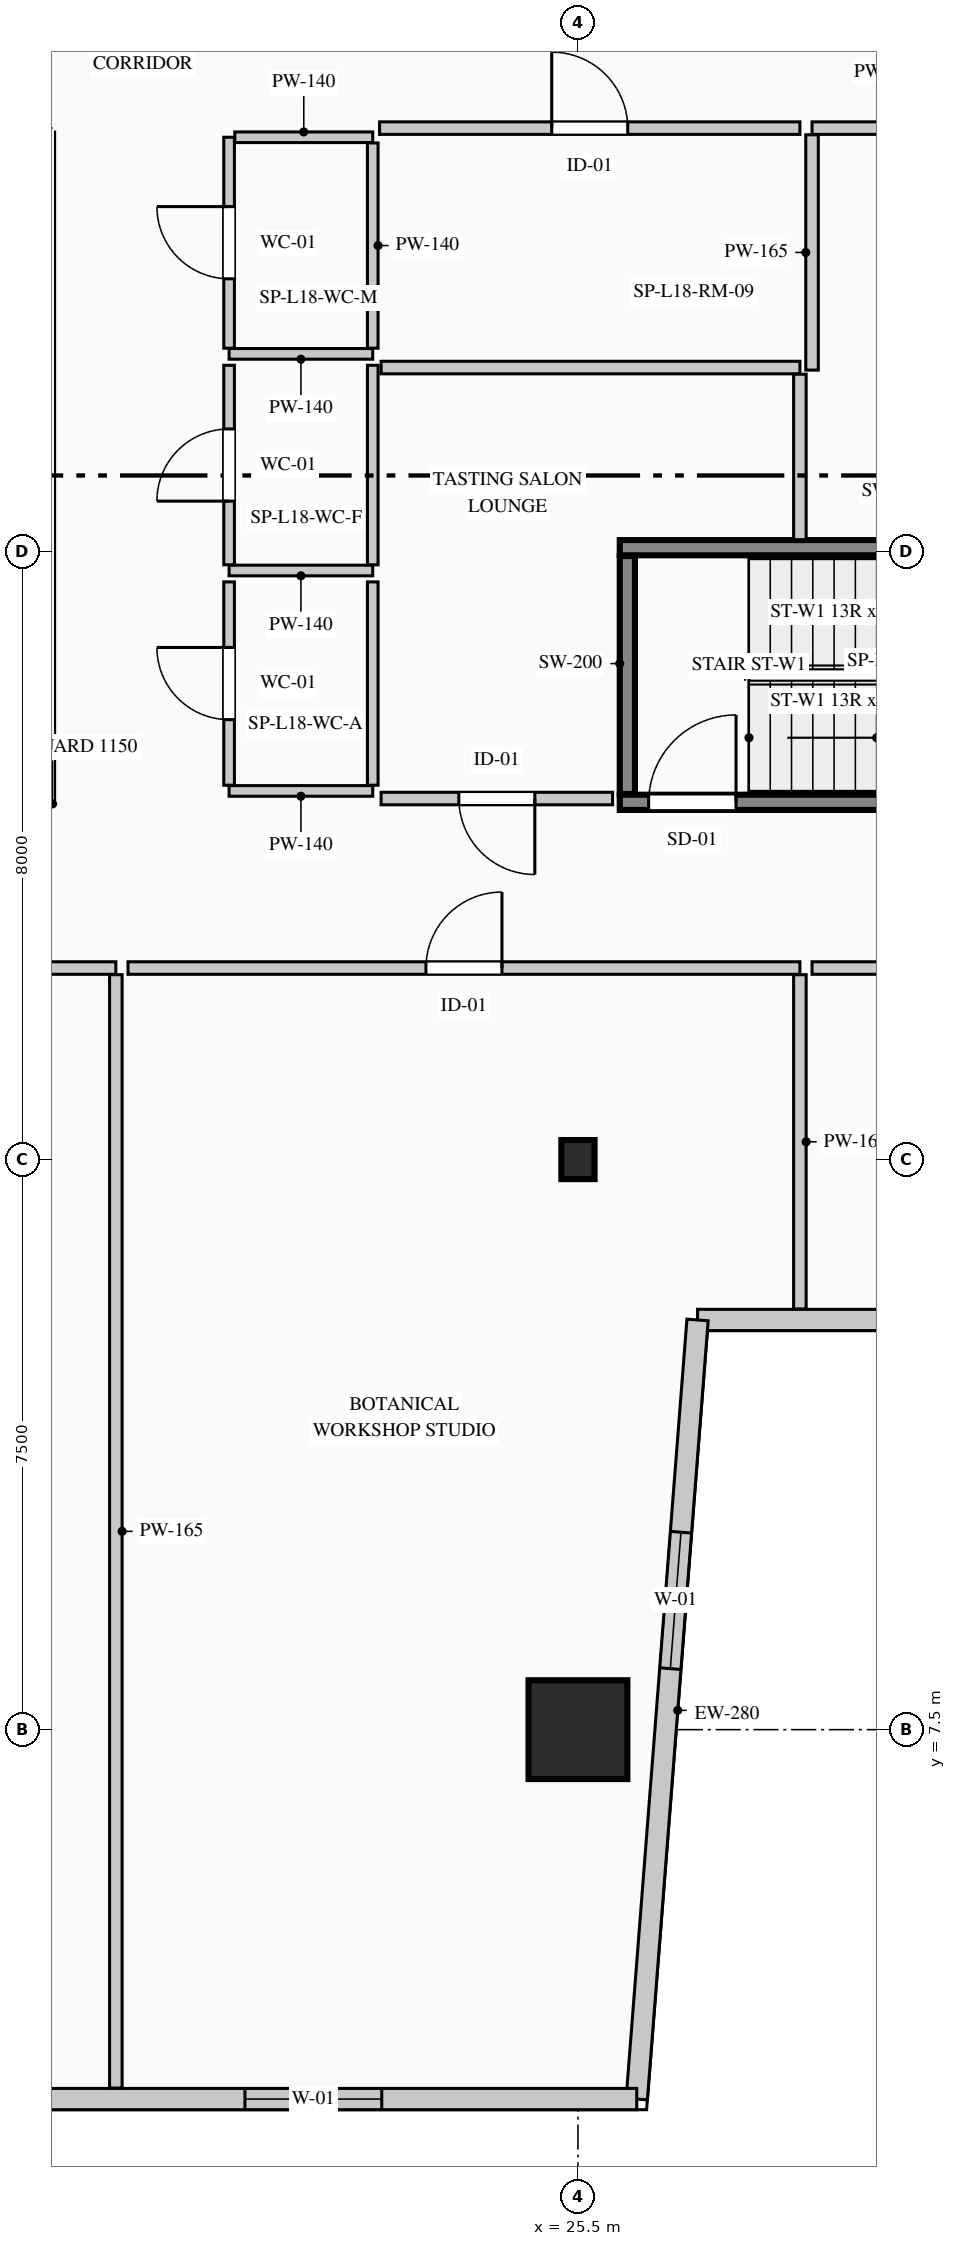
"""IFC4 building model, lengths in metres.
Left out: names, types, materials, properties, quantities, classifications, styles, units other than length and angle.
Written with IfcOpenShell. Run it as: python <this file> out.ifc"""

import sys

from ifc_helpers import new_model, si_unit, direction, frame, frame_2d, origin, origin_2d, place, context, subcontext, project, spatial, rectangle, i_section, extrude, element, fill, save


model = new_model("IFC4")
c1 = context("Model", 3, precision=1e-05, world=origin(), true_north=direction((0.0, 1.0)))
c2 = subcontext(c1, "Body", "Model", "MODEL_VIEW")
j1 = project(units=[si_unit("LENGTHUNIT", "METRE"), si_unit("PLANEANGLEUNIT", "RADIAN")], contexts=[c1])
p1 = place(None, origin())
s1 = spatial("IfcSite", under=j1, at=p1, CompositionType="ELEMENT")
p2 = place(p1, origin())
s2 = spatial("IfcBuilding", under=s1, at=p2, CompositionType="ELEMENT")
p3 = place(p2, frame((0.0, 0.0, 79.8)))
s3 = spatial("IfcBuildingStorey", under=s2, at=p3, CompositionType="ELEMENT", Elevation=79.8)
p4 = place(p3, frame((26.05, 19.7, 0.0), z_axis=(0.0, 0.0, 1.0), x_axis=(1.0, 0.0, 0.0)))
e1 = element("IfcWall", 1, at=p4, inside=s3, PredefinedType="SHEAR", context=c2, shape_type="SweptSolid", body=[
    extrude(rectangle(XDim=7.2, YDim=0.2, at=frame_2d((3.6, 0.0))), origin(), (0.0, 0.0, 1.0), 4.4),
])
p5 = place(p4, frame((0.38, 0.0, 0.0)))
e2 = element("IfcOpeningElement", 2, at=p5, cuts=e1, PredefinedType="OPENING", context=c2, shape_type="SweptSolid", body=[
    extrude(rectangle(XDim=1.15, YDim=2.2, at=frame_2d((0.575, 1.1))), frame((0.0, 0.11, 0.0), z_axis=(0.0, -1.0, 0.0), x_axis=(1.0, 0.0, 0.0)), (0.0, 0.0, 1.0), 0.22),
])
p6 = place(p3, frame((26.05, 23.05, 0.0), z_axis=(0.0, 0.0, 1.0), x_axis=(1.0, 0.0, 0.0)))
e3 = element("IfcWall", 3, at=p6, inside=s3, PredefinedType="SHEAR", context=c2, shape_type="SweptSolid", body=[
    extrude(rectangle(XDim=7.2, YDim=0.2, at=frame_2d((3.6, 0.0))), origin(), (0.0, 0.0, 1.0), 4.4),
])
p7 = place(p3, frame((26.15, 19.81, 0.0), z_axis=(0.0, 0.0, 1.0), x_axis=(0.0, 1.0, 0.0)))
e4 = element("IfcWall", 4, at=p7, inside=s3, PredefinedType="SHEAR", context=c2, shape_type="SweptSolid", body=[
    extrude(rectangle(XDim=3.13, YDim=0.2, at=frame_2d((1.565, 0.0))), origin(), (0.0, 0.0, 1.0), 4.4),
])
p8 = place(p3, frame((25.5, 7.5, 0.0), z_axis=(0.0, 0.0, 1.0), x_axis=(1.0, 0.0, 0.0)))
e5 = element("IfcColumn", 5, at=p8, inside=s3, PredefinedType="COLUMN", context=c2, shape_type="SweptSolid", body=[
    extrude(rectangle(XDim=1.3, YDim=1.3, at=origin_2d()), origin(), (0.0, 0.0, 1.0), 4.4),
])
p9 = place(p3, frame((25.5, 15.0, 0.0), z_axis=(0.0, 0.0, 1.0), x_axis=(1.0, 0.0, 0.0)))
e6 = element("IfcColumn", 6, at=p9, inside=s3, PredefinedType="COLUMN", context=c2, shape_type="SweptSolid", body=[
    extrude(i_section(OverallWidth=0.437, OverallDepth=0.514, WebThickness=0.061, FlangeThickness=0.077, FilletRadius=0.015, at=origin_2d()), origin(), (0.0, 0.0, 1.0), 4.4),
])
p10 = place(p3, frame((35.77, 12.89, 0.0), z_axis=(0.0, 0.0, 1.0), x_axis=(-1.0, 0.0, 0.0)))
e7 = element("IfcWall", 7, at=p10, inside=s3, PredefinedType="STANDARD", context=c2, shape_type="SweptSolid", body=[
    extrude(rectangle(XDim=8.697, YDim=0.28, at=frame_2d((4.348, 0.0))), origin(), (0.0, 0.0, 1.0), 4.115),
])
p11 = place(p10, frame((3.448, 0.0, 0.9)))
e8 = element("IfcOpeningElement", 8, at=p11, cuts=e7, PredefinedType="OPENING", context=c2, shape_type="SweptSolid", body=[
    extrude(rectangle(XDim=1.8, YDim=2.1, at=frame_2d((0.9, 1.05))), frame((0.0, 0.15, 0.0), z_axis=(0.0, -1.0, 0.0), x_axis=(1.0, 0.0, 0.0)), (0.0, 0.0, 1.0), 0.3),
])
p12 = place(p3, frame((27.073, 12.89, 0.0), z_axis=(0.0, 0.0, 1.0), x_axis=(-0.077816860153, -0.996967670627, 0.0)))
e9 = element("IfcWall", 9, at=p12, inside=s3, PredefinedType="STANDARD", context=c2, shape_type="SweptSolid", body=[
    extrude(rectangle(XDim=10.281, YDim=0.28, at=frame_2d((5.141, 0.0))), origin(), (0.0, 0.0, 1.0), 4.115),
])
p13 = place(p12, frame((2.801, 0.0, 0.9)))
e10 = element("IfcOpeningElement", 10, at=p13, cuts=e9, PredefinedType="OPENING", context=c2, shape_type="SweptSolid", body=[
    extrude(rectangle(XDim=1.8, YDim=2.1, at=frame_2d((0.9, 1.05))), frame((0.0, 0.15, 0.0), z_axis=(0.0, -1.0, 0.0), x_axis=(1.0, 0.0, 0.0)), (0.0, 0.0, 1.0), 0.3),
])
p14 = place(p3, frame((26.273, 2.64, 0.0), z_axis=(0.0, 0.0, 1.0), x_axis=(-1.0, 0.0, 0.0)))
e11 = element("IfcWall", 11, at=p14, inside=s3, PredefinedType="STANDARD", context=c2, shape_type="SweptSolid", body=[
    extrude(rectangle(XDim=15.197, YDim=0.28, at=frame_2d((7.598, 0.0))), origin(), (0.0, 0.0, 1.0), 4.115),
])
p15 = place(p14, frame((3.355, 0.0, 0.9)))
e12 = element("IfcOpeningElement", 12, at=p15, cuts=e11, PredefinedType="OPENING", context=c2, shape_type="SweptSolid", body=[
    extrude(rectangle(XDim=1.8, YDim=2.1, at=frame_2d((0.9, 1.05))), frame((0.0, 0.15, 0.0), z_axis=(0.0, -1.0, 0.0), x_axis=(1.0, 0.0, 0.0)), (0.0, 0.0, 1.0), 0.3),
])
p16 = place(p3, frame((22.8, 25.6, 0.0), z_axis=(0.0, 0.0, 1.0), x_axis=(-1.0, 0.0, 0.0)))
e13 = element("IfcWall", 13, at=p16, inside=s3, PredefinedType="PARTITIONING", context=c2, shape_type="SweptSolid", body=[
    extrude(rectangle(XDim=1.89, YDim=0.14, at=frame_2d((0.945, 0.0))), origin(), (0.0, 0.0, 1.0), 4.115),
])
p17 = place(p3, frame((20.91, 25.675, 0.0), z_axis=(0.0, 0.0, 1.0), x_axis=(0.0, 1.0, 0.0)))
e14 = element("IfcWall", 14, at=p17, inside=s3, PredefinedType="PARTITIONING", context=c2, shape_type="SweptSolid", body=[
    extrude(rectangle(XDim=2.775, YDim=0.14, at=frame_2d((1.387, 0.0))), origin(), (0.0, 0.0, 1.0), 4.115),
])
p18 = place(p17, frame((0.913, 0.0, 0.0)))
e15 = element("IfcOpeningElement", 15, at=p18, cuts=e14, PredefinedType="OPENING", context=c2, shape_type="SweptSolid", body=[
    extrude(rectangle(XDim=0.95, YDim=2.15, at=frame_2d((0.475, 1.075))), frame((0.0, 0.08, 0.0), z_axis=(0.0, -1.0, 0.0), x_axis=(1.0, 0.0, 0.0)), (0.0, 0.0, 1.0), 0.16),
])
p19 = place(p3, frame((20.985, 28.45, 0.0), z_axis=(0.0, 0.0, 1.0), x_axis=(1.0, 0.0, 0.0)))
e16 = element("IfcWall", 16, at=p19, inside=s3, PredefinedType="PARTITIONING", context=c2, shape_type="SweptSolid", body=[
    extrude(rectangle(XDim=1.815, YDim=0.14, at=frame_2d((0.907, 0.0))), origin(), (0.0, 0.0, 1.0), 4.115),
])
p20 = place(p3, frame((22.8, 28.375, 0.0), z_axis=(0.0, 0.0, 1.0), x_axis=(0.0, -1.0, 0.0)))
e17 = element("IfcWall", 17, at=p20, inside=s3, PredefinedType="PARTITIONING", context=c2, shape_type="SweptSolid", body=[
    extrude(rectangle(XDim=2.7, YDim=0.14, at=frame_2d((1.35, 0.0))), origin(), (0.0, 0.0, 1.0), 3.8),
])
p21 = place(p3, frame((22.8, 22.75, 0.0), z_axis=(0.0, 0.0, 1.0), x_axis=(-1.0, 0.0, 0.0)))
e18 = element("IfcWall", 18, at=p21, inside=s3, PredefinedType="PARTITIONING", context=c2, shape_type="SweptSolid", body=[
    extrude(rectangle(XDim=1.89, YDim=0.14, at=frame_2d((0.945, 0.0))), origin(), (0.0, 0.0, 1.0), 4.115),
])
p22 = place(p3, frame((20.91, 22.825, 0.0), z_axis=(0.0, 0.0, 1.0), x_axis=(0.0, 1.0, 0.0)))
e19 = element("IfcWall", 19, at=p22, inside=s3, PredefinedType="PARTITIONING", context=c2, shape_type="SweptSolid", body=[
    extrude(rectangle(XDim=2.625, YDim=0.14, at=frame_2d((1.312, 0.0))), origin(), (0.0, 0.0, 1.0), 4.115),
])
p23 = place(p22, frame((0.837, 0.0, 0.0)))
e20 = element("IfcOpeningElement", 20, at=p23, cuts=e19, PredefinedType="OPENING", context=c2, shape_type="SweptSolid", body=[
    extrude(rectangle(XDim=0.95, YDim=2.15, at=frame_2d((0.475, 1.075))), frame((0.0, 0.08, 0.0), z_axis=(0.0, -1.0, 0.0), x_axis=(1.0, 0.0, 0.0)), (0.0, 0.0, 1.0), 0.16),
])
p24 = place(p3, frame((22.8, 25.45, 0.0), z_axis=(0.0, 0.0, 1.0), x_axis=(0.0, -1.0, 0.0)))
e21 = element("IfcWall", 21, at=p24, inside=s3, PredefinedType="PARTITIONING", context=c2, shape_type="SweptSolid", body=[
    extrude(rectangle(XDim=2.625, YDim=0.14, at=frame_2d((1.312, 0.0))), origin(), (0.0, 0.0, 1.0), 3.8),
])
p25 = place(p3, frame((22.8, 19.85, 0.0), z_axis=(0.0, 0.0, 1.0), x_axis=(-1.0, 0.0, 0.0)))
e22 = element("IfcWall", 22, at=p25, inside=s3, PredefinedType="PARTITIONING", context=c2, shape_type="SweptSolid", body=[
    extrude(rectangle(XDim=1.89, YDim=0.14, at=frame_2d((0.945, 0.0))), origin(), (0.0, 0.0, 1.0), 4.115),
])
p26 = place(p3, frame((20.91, 19.925, 0.0), z_axis=(0.0, 0.0, 1.0), x_axis=(0.0, 1.0, 0.0)))
e23 = element("IfcWall", 23, at=p26, inside=s3, PredefinedType="PARTITIONING", context=c2, shape_type="SweptSolid", body=[
    extrude(rectangle(XDim=2.675, YDim=0.14, at=frame_2d((1.337, 0.0))), origin(), (0.0, 0.0, 1.0), 4.115),
])
p27 = place(p26, frame((0.863, 0.0, 0.0)))
e24 = element("IfcOpeningElement", 24, at=p27, cuts=e23, PredefinedType="OPENING", context=c2, shape_type="SweptSolid", body=[
    extrude(rectangle(XDim=0.95, YDim=2.15, at=frame_2d((0.475, 1.075))), frame((0.0, 0.08, 0.0), z_axis=(0.0, -1.0, 0.0), x_axis=(1.0, 0.0, 0.0)), (0.0, 0.0, 1.0), 0.16),
])
p28 = place(p3, frame((22.8, 22.6, 0.0), z_axis=(0.0, 0.0, 1.0), x_axis=(0.0, -1.0, 0.0)))
e25 = element("IfcWall", 25, at=p28, inside=s3, PredefinedType="PARTITIONING", context=c2, shape_type="SweptSolid", body=[
    extrude(rectangle(XDim=2.675, YDim=0.14, at=frame_2d((1.337, 0.0))), origin(), (0.0, 0.0, 1.0), 3.8),
])
p29 = place(p3, frame((10.667, 17.52, 0.0), z_axis=(0.0, 0.0, 1.0), x_axis=(1.0, 0.0, 0.0)))
e26 = element("IfcWall", 26, at=p29, inside=s3, PredefinedType="PARTITIONING", context=c2, shape_type="SweptSolid", body=[
    extrude(rectangle(XDim=8.752, YDim=0.165, at=frame_2d((4.376, 0.0))), origin(), (0.0, 0.0, 1.0), 4.115),
])
p30 = place(p29, frame((3.876, 0.0, 0.0)))
e27 = element("IfcOpeningElement", 27, at=p30, cuts=e26, PredefinedType="OPENING", context=c2, shape_type="SweptSolid", body=[
    extrude(rectangle(XDim=1.0, YDim=2.15, at=frame_2d((0.5, 1.075))), frame((0.0, 0.093, 0.0), z_axis=(0.0, -1.0, 0.0), x_axis=(1.0, 0.0, 0.0)), (0.0, 0.0, 1.0), 0.185),
])
p31 = place(p3, frame((19.42, 17.433, 0.0), z_axis=(0.0, 0.0, 1.0), x_axis=(0.0, -1.0, 0.0)))
e28 = element("IfcWall", 28, at=p31, inside=s3, PredefinedType="PARTITIONING", context=c2, shape_type="SweptSolid", body=[
    extrude(rectangle(XDim=14.648, YDim=0.165, at=frame_2d((7.324, 0.0))), origin(), (0.0, 0.0, 1.0), 3.8),
])
p32 = place(p3, frame((19.58, 17.52, 0.0), z_axis=(0.0, 0.0, 1.0), x_axis=(1.0, 0.0, 0.0)))
e29 = element("IfcWall", 29, at=p32, inside=s3, PredefinedType="PARTITIONING", context=c2, shape_type="SweptSolid", body=[
    extrude(rectangle(XDim=8.84, YDim=0.165, at=frame_2d((4.42, 0.0))), origin(), (0.0, 0.0, 1.0), 3.8),
])
p33 = place(p32, frame((3.92, 0.0, 0.0)))
e30 = element("IfcOpeningElement", 30, at=p33, cuts=e29, PredefinedType="OPENING", context=c2, shape_type="SweptSolid", body=[
    extrude(rectangle(XDim=1.0, YDim=2.15, at=frame_2d((0.5, 1.075))), frame((0.0, 0.093, 0.0), z_axis=(0.0, -1.0, 0.0), x_axis=(1.0, 0.0, 0.0)), (0.0, 0.0, 1.0), 0.185),
])
p34 = place(p3, frame((28.42, 17.433, 0.0), z_axis=(0.0, 0.0, 1.0), x_axis=(0.0, -1.0, 0.0)))
e31 = element("IfcWall", 31, at=p34, inside=s3, PredefinedType="PARTITIONING", context=c2, shape_type="SweptSolid", body=[
    extrude(rectangle(XDim=4.398, YDim=0.165, at=frame_2d((2.199, 0.0))), origin(), (0.0, 0.0, 1.0), 4.115),
])
p35 = place(p3, frame((28.58, 17.52, 0.0), z_axis=(0.0, 0.0, 1.0), x_axis=(1.0, 0.0, 0.0)))
e32 = element("IfcWall", 32, at=p35, inside=s3, PredefinedType="PARTITIONING", context=c2, shape_type="SweptSolid", body=[
    extrude(rectangle(XDim=10.84, YDim=0.165, at=frame_2d((5.42, 0.0))), origin(), (0.0, 0.0, 1.0), 3.8),
])
p36 = place(p35, frame((4.92, 0.0, 0.0)))
e33 = element("IfcOpeningElement", 33, at=p36, cuts=e32, PredefinedType="OPENING", context=c2, shape_type="SweptSolid", body=[
    extrude(rectangle(XDim=1.0, YDim=2.15, at=frame_2d((0.5, 1.075))), frame((0.0, 0.093, 0.0), z_axis=(0.0, -1.0, 0.0), x_axis=(1.0, 0.0, 0.0)), (0.0, 0.0, 1.0), 0.185),
])
p37 = place(p3, frame((25.956, 19.75, 0.0), z_axis=(0.0, 0.0, 1.0), x_axis=(-1.0, 0.0, 0.0)))
e34 = element("IfcWall", 34, at=p37, inside=s3, PredefinedType="PARTITIONING", context=c2, shape_type="SweptSolid", body=[
    extrude(rectangle(XDim=3.046, YDim=0.165, at=frame_2d((1.523, 0.0))), origin(), (0.0, 0.0, 1.0), 4.115),
])
p38 = place(p37, frame((1.023, 0.0, 0.0)))
e35 = element("IfcOpeningElement", 35, at=p38, cuts=e34, PredefinedType="OPENING", context=c2, shape_type="SweptSolid", body=[
    extrude(rectangle(XDim=1.0, YDim=2.15, at=frame_2d((0.5, 1.075))), frame((0.0, 0.093, 0.0), z_axis=(0.0, -1.0, 0.0), x_axis=(1.0, 0.0, 0.0)), (0.0, 0.0, 1.0), 0.185),
])
p39 = place(p3, frame((22.91, 25.42, 0.0), z_axis=(0.0, 0.0, 1.0), x_axis=(1.0, 0.0, 0.0)))
e36 = element("IfcWall", 36, at=p39, inside=s3, PredefinedType="PARTITIONING", context=c2, shape_type="SweptSolid", body=[
    extrude(rectangle(XDim=5.51, YDim=0.165, at=frame_2d((2.755, 0.0))), origin(), (0.0, 0.0, 1.0), 3.8),
])
p40 = place(p3, frame((28.42, 25.333, 0.0), z_axis=(0.0, 0.0, 1.0), x_axis=(0.0, -1.0, 0.0)))
e37 = element("IfcWall", 37, at=p40, inside=s3, PredefinedType="PARTITIONING", context=c2, shape_type="SweptSolid", body=[
    extrude(rectangle(XDim=2.177, YDim=0.165, at=frame_2d((1.089, 0.0))), origin(), (0.0, 0.0, 1.0), 4.115),
])
p41 = place(p3, frame((28.58, 28.57, 0.0), z_axis=(0.0, 0.0, 1.0), x_axis=(1.0, 0.0, 0.0)))
e38 = element("IfcWall", 38, at=p41, inside=s3, PredefinedType="PARTITIONING", context=c2, shape_type="SweptSolid", body=[
    extrude(rectangle(XDim=5.79, YDim=0.165, at=frame_2d((2.895, 0.0))), origin(), (0.0, 0.0, 1.0), 3.8),
])
p42 = place(p41, frame((2.395, 0.0, 0.0)))
e39 = element("IfcOpeningElement", 39, at=p42, cuts=e38, PredefinedType="OPENING", context=c2, shape_type="SweptSolid", body=[
    extrude(rectangle(XDim=1.0, YDim=2.15, at=frame_2d((0.5, 1.075))), frame((0.0, 0.093, 0.0), z_axis=(0.0, -1.0, 0.0), x_axis=(1.0, 0.0, 0.0)), (0.0, 0.0, 1.0), 0.185),
])
p43 = place(p3, frame((28.58, 25.386, 0.0), z_axis=(0.0, 0.0, 1.0), x_axis=(0.0, 1.0, 0.0)))
e40 = element("IfcWall", 40, at=p43, inside=s3, PredefinedType="PARTITIONING", context=c2, shape_type="SweptSolid", body=[
    extrude(rectangle(XDim=3.096, YDim=0.165, at=frame_2d((1.548, 0.0))), origin(), (0.0, 0.0, 1.0), 4.115),
])
p44 = place(p3, frame((22.89, 28.57, 0.0), z_axis=(0.0, 0.0, 1.0), x_axis=(1.0, 0.0, 0.0)))
e41 = element("IfcWall", 41, at=p44, inside=s3, PredefinedType="PARTITIONING", context=c2, shape_type="SweptSolid", body=[
    extrude(rectangle(XDim=5.53, YDim=0.165, at=frame_2d((2.765, 0.0))), origin(), (0.0, 0.0, 1.0), 3.8),
])
p45 = place(p44, frame((2.265, 0.0, 0.0)))
e42 = element("IfcOpeningElement", 42, at=p45, cuts=e41, PredefinedType="OPENING", context=c2, shape_type="SweptSolid", body=[
    extrude(rectangle(XDim=1.0, YDim=2.15, at=frame_2d((0.5, 1.075))), frame((0.0, 0.093, 0.0), z_axis=(0.0, -1.0, 0.0), x_axis=(1.0, 0.0, 0.0)), (0.0, 0.0, 1.0), 0.185),
])
p46 = place(p13, origin())
e43 = element("IfcWindow", 43, at=p46, inside=s3, PartitioningType="SINGLE_PANEL", PredefinedType="WINDOW", context=c2, shape_type="SweptSolid", body=[
    extrude(rectangle(XDim=1.8, YDim=2.1, at=frame_2d((0.9, 1.05))), frame((0.0, 0.03, 0.0), z_axis=(0.0, -1.0, 0.0), x_axis=(1.0, 0.0, 0.0)), (0.0, 0.0, 1.0), 0.06),
])
fill(e10, e43)
p47 = place(p15, origin())
e44 = element("IfcWindow", 44, at=p47, inside=s3, PartitioningType="SINGLE_PANEL", PredefinedType="WINDOW", context=c2, shape_type="SweptSolid", body=[
    extrude(rectangle(XDim=1.8, YDim=2.1, at=frame_2d((0.9, 1.05))), frame((0.0, 0.03, 0.0), z_axis=(0.0, -1.0, 0.0), x_axis=(1.0, 0.0, 0.0)), (0.0, 0.0, 1.0), 0.06),
])
fill(e12, e44)
p48 = place(p5, origin())
e45 = element("IfcDoor", 45, at=p48, inside=s3, OperationType="SINGLE_SWING_RIGHT", PredefinedType="DOOR", context=c2, shape_type="SweptSolid", body=[
    extrude(rectangle(XDim=1.15, YDim=2.2, at=frame_2d((0.575, 1.1))), frame((0.0, 0.025, 0.0), z_axis=(0.0, -1.0, 0.0), x_axis=(1.0, 0.0, 0.0)), (0.0, 0.0, 1.0), 0.05),
])
fill(e2, e45)
p49 = place(p18, origin())
e46 = element("IfcDoor", 46, at=p49, inside=s3, OperationType="SINGLE_SWING_RIGHT", PredefinedType="DOOR", context=c2, shape_type="SweptSolid", body=[
    extrude(rectangle(XDim=0.95, YDim=2.15, at=frame_2d((0.475, 1.075))), frame((0.0, 0.025, 0.0), z_axis=(0.0, -1.0, 0.0), x_axis=(1.0, 0.0, 0.0)), (0.0, 0.0, 1.0), 0.05),
])
fill(e15, e46)
p50 = place(p23, origin())
e47 = element("IfcDoor", 47, at=p50, inside=s3, OperationType="SINGLE_SWING_LEFT", PredefinedType="DOOR", context=c2, shape_type="SweptSolid", body=[
    extrude(rectangle(XDim=0.95, YDim=2.15, at=frame_2d((0.475, 1.075))), frame((0.0, 0.025, 0.0), z_axis=(0.0, -1.0, 0.0), x_axis=(1.0, 0.0, 0.0)), (0.0, 0.0, 1.0), 0.05),
])
fill(e20, e47)
p51 = place(p27, origin())
e48 = element("IfcDoor", 48, at=p51, inside=s3, OperationType="SINGLE_SWING_RIGHT", PredefinedType="DOOR", context=c2, shape_type="SweptSolid", body=[
    extrude(rectangle(XDim=0.95, YDim=2.15, at=frame_2d((0.475, 1.075))), frame((0.0, 0.025, 0.0), z_axis=(0.0, -1.0, 0.0), x_axis=(1.0, 0.0, 0.0)), (0.0, 0.0, 1.0), 0.05),
])
fill(e24, e48)
p52 = place(p33, origin())
e49 = element("IfcDoor", 49, at=p52, inside=s3, OperationType="SINGLE_SWING_RIGHT", PredefinedType="DOOR", context=c2, shape_type="SweptSolid", body=[
    extrude(rectangle(XDim=1.0, YDim=2.15, at=frame_2d((0.5, 1.075))), frame((0.0, 0.025, 0.0), z_axis=(0.0, -1.0, 0.0), x_axis=(1.0, 0.0, 0.0)), (0.0, 0.0, 1.0), 0.05),
])
fill(e30, e49)
p53 = place(p38, origin())
e50 = element("IfcDoor", 50, at=p53, inside=s3, OperationType="SINGLE_SWING_LEFT", PredefinedType="DOOR", context=c2, shape_type="SweptSolid", body=[
    extrude(rectangle(XDim=1.0, YDim=2.15, at=frame_2d((0.5, 1.075))), frame((0.0, 0.025, 0.0), z_axis=(0.0, -1.0, 0.0), x_axis=(1.0, 0.0, 0.0)), (0.0, 0.0, 1.0), 0.05),
])
fill(e35, e50)
p54 = place(p45, origin())
e51 = element("IfcDoor", 51, at=p54, inside=s3, OperationType="SINGLE_SWING_LEFT", PredefinedType="DOOR", context=c2, shape_type="SweptSolid", body=[
    extrude(rectangle(XDim=1.0, YDim=2.15, at=frame_2d((0.5, 1.075))), frame((0.0, 0.025, 0.0), z_axis=(0.0, -1.0, 0.0), x_axis=(1.0, 0.0, 0.0)), (0.0, 0.0, 1.0), 0.05),
])
fill(e42, e51)
save(model, sys.argv[1])
